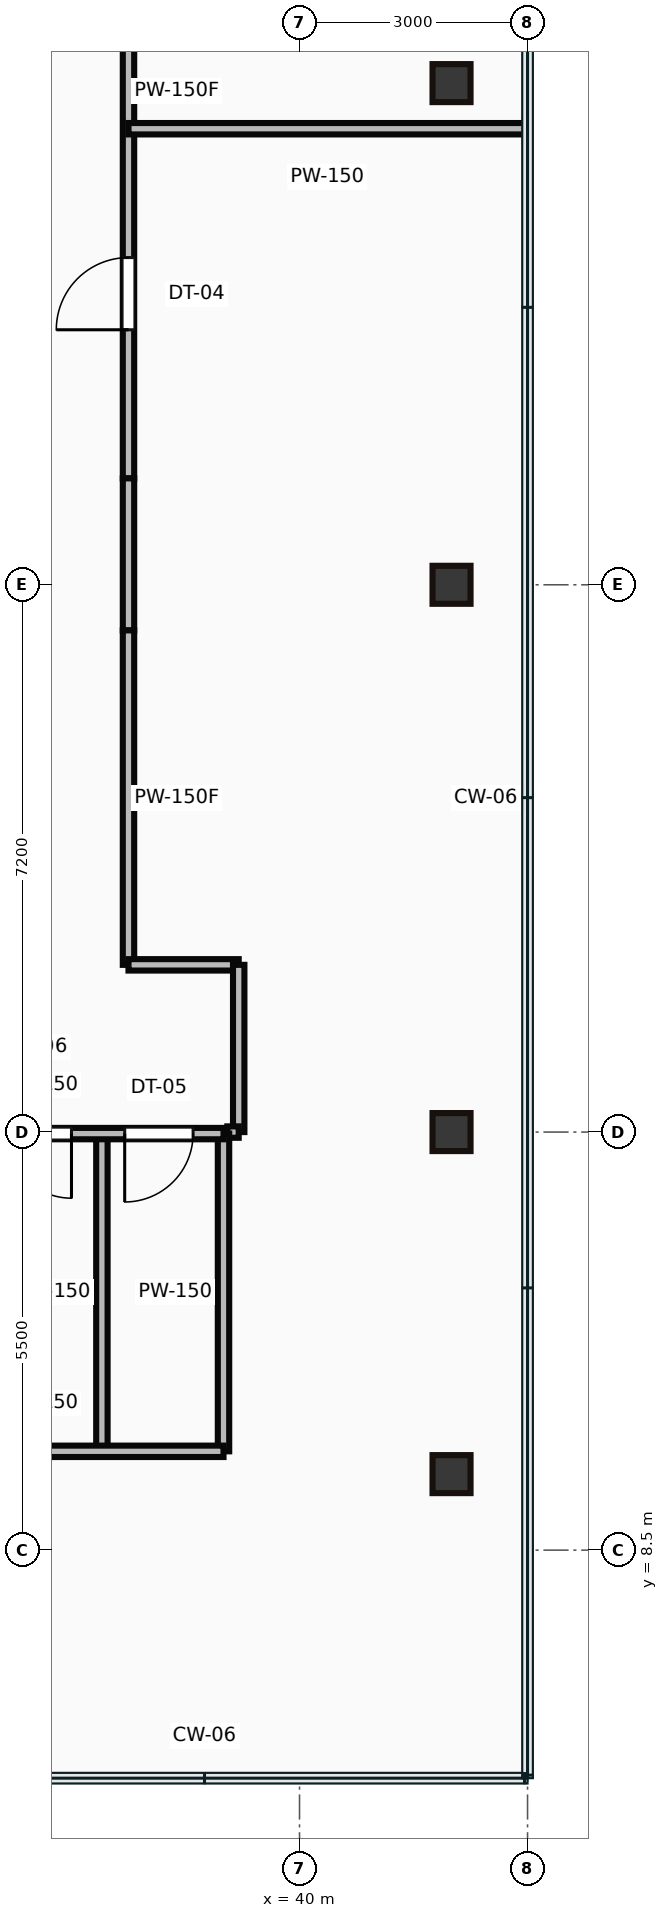
"""IFC4 building model, lengths in metres.
Left out: names, types, materials, properties, quantities, classifications, styles, units other than length and angle.
Written with IfcOpenShell. Run it as: python <this file> out.ifc"""

import sys

from ifc_helpers import new_model, si_unit, direction, frame, frame_2d, origin, origin_2d, place, context, subcontext, project, spatial, rectangle, hollow_rectangle, extrude, source, transform, mapped, element, fill, save


model = new_model("IFC4")
c1 = context("Model", 3, precision=1e-05, world=origin(), true_north=direction((0.0, 1.0)))
c2 = subcontext(c1, "Body", "Model", "MODEL_VIEW")
j1 = project(units=[si_unit("LENGTHUNIT", "METRE"), si_unit("PLANEANGLEUNIT", "RADIAN")], contexts=[c1])
p1 = place(None, origin())
s1 = spatial("IfcSite", under=j1, at=p1, CompositionType="ELEMENT")
p2 = place(p1, origin())
s2 = spatial("IfcBuilding", under=s1, at=p2, CompositionType="ELEMENT")
p3 = place(p2, frame((0.0, 0.0, 288.0)))
s3 = spatial("IfcBuildingStorey", under=s2, at=p3, CompositionType="ELEMENT", Elevation=288.0)
m1 = source(origin(), c2, "Body", "SweptSolid", [
    extrude(hollow_rectangle(XDim=0.5, YDim=0.5, WallThickness=0.022, at=origin_2d()), origin(), (0.0, 0.0, 1.0), 4.25),
])
for number, where, z_axis, x_axis in (
    (1, (42.0, 9.5, 0.0), (0.0, 0.0, 1.0), (1.0, 0.0, 0.0)),
    (2, (42.0, 14.0, 0.0), (0.0, 0.0, 1.0), (1.0, 0.0, 0.0)),
    (3, (42.0, 21.2, 0.0), (0.0, 0.0, 1.0), (1.0, 0.0, 0.0)),
    (4, (42.0, 27.8, 0.0), (0.0, 0.0, 1.0), (1.0, 0.0, 0.0)),
):
    element("IfcColumn", number, at=place(p3, frame(where, z_axis=z_axis, x_axis=x_axis)), inside=s3, PredefinedType="COLUMN", context=c2, shape_type="MappedRepresentation", body=[
        mapped(m1, transform((0.0, 0.0, 0.0))),
    ])
m2 = source(origin(), c2, "Body", "SweptSolid", [
    extrude(rectangle(XDim=4.8, YDim=0.15, at=frame_2d((2.4, 0.0))), origin(), (0.0, 0.0, 1.0), 2.845),
])
p4 = place(p3, frame((34.2, 13.98, 0.0), z_axis=(0.0, 0.0, 1.0), x_axis=(1.0, 0.0, 0.0)))
e5 = element("IfcWall", 5, at=p4, inside=s3, PredefinedType="PARTITIONING", context=c2, shape_type="MappedRepresentation", body=[
    mapped(m2, transform((0.0, 0.0, 0.0))),
])
p5 = place(p4, frame((0.35, 0.0, 0.0)))
e6 = element("IfcOpeningElement", 6, at=p5, cuts=e5, PredefinedType="OPENING", context=c2, shape_type="SweptSolid", body=[
    extrude(rectangle(XDim=0.85, YDim=2.1, at=frame_2d((0.425, 1.05))), frame((0.0, 0.085, 0.0), z_axis=(0.0, -1.0, 0.0), x_axis=(1.0, 0.0, 0.0)), (0.0, 0.0, 1.0), 0.17),
])
p6 = place(p4, frame((1.95, 0.0, 0.0)))
e7 = element("IfcOpeningElement", 7, at=p6, cuts=e5, PredefinedType="OPENING", context=c2, shape_type="SweptSolid", body=[
    extrude(rectangle(XDim=0.85, YDim=2.1, at=frame_2d((0.425, 1.05))), frame((0.0, 0.085, 0.0), z_axis=(0.0, -1.0, 0.0), x_axis=(1.0, 0.0, 0.0)), (0.0, 0.0, 1.0), 0.17),
])
p7 = place(p4, frame((3.5, 0.0, 0.0)))
e8 = element("IfcOpeningElement", 8, at=p7, cuts=e5, PredefinedType="OPENING", context=c2, shape_type="SweptSolid", body=[
    extrude(rectangle(XDim=0.9, YDim=2.1, at=frame_2d((0.45, 1.05))), frame((0.0, 0.085, 0.0), z_axis=(0.0, -1.0, 0.0), x_axis=(1.0, 0.0, 0.0)), (0.0, 0.0, 1.0), 0.17),
])
m3 = source(origin(), c2, "Body", "SweptSolid", [
    extrude(rectangle(XDim=4.8, YDim=0.15, at=frame_2d((2.4, 0.0))), origin(), (0.0, 0.0, 1.0), 3.85),
])
p8 = place(p3, frame((34.2, 9.8, 0.0), z_axis=(0.0, 0.0, 1.0), x_axis=(1.0, 0.0, 0.0)))
e9 = element("IfcWall", 9, at=p8, inside=s3, PredefinedType="PARTITIONING", context=c2, shape_type="MappedRepresentation", body=[
    mapped(m3, transform((0.0, 0.0, 0.0))),
])
m4 = source(origin(), c2, "Body", "SweptSolid", [
    extrude(rectangle(XDim=4.18, YDim=0.15, at=frame_2d((2.09, 0.0))), origin(), (0.0, 0.0, 1.0), 3.85),
])
for number, where, z_axis, x_axis in (
    (10, (39.0, 9.8, 0.0), (0.0, 0.0, 1.0), (0.0, 1.0, 0.0)),
    (11, (37.4, 9.8, 0.0), (0.0, 0.0, 1.0), (0.0, 1.0, 0.0)),
):
    element("IfcWall", number, at=place(p3, frame(where, z_axis=z_axis, x_axis=x_axis)), inside=s3, PredefinedType="PARTITIONING", context=c2, shape_type="MappedRepresentation", body=[
        mapped(m4, transform((0.0, 0.0, 0.0))),
    ])
m5 = source(origin(), c2, "Body", "SweptSolid", [
    extrude(rectangle(XDim=10.2, YDim=0.15, at=frame_2d((5.1, 0.0))), origin(), (0.0, 0.0, 1.0), 3.85),
])
p9 = place(p3, frame((37.75, 32.8, 0.0), z_axis=(0.0, 0.0, 1.0), x_axis=(0.0, -1.0, 0.0)))
e12 = element("IfcWall", 12, at=p9, inside=s3, PredefinedType="PARTITIONING", context=c2, shape_type="MappedRepresentation", body=[
    mapped(m5, transform((0.0, 0.0, 0.0))),
])
p10 = place(p9, frame((7.295, 0.0, 0.0)))
e13 = element("IfcOpeningElement", 13, at=p10, cuts=e12, PredefinedType="OPENING", context=c2, shape_type="SweptSolid", body=[
    extrude(rectangle(XDim=0.95, YDim=2.15, at=frame_2d((0.475, 1.075))), frame((0.0, 0.085, 0.0), z_axis=(0.0, -1.0, 0.0), x_axis=(1.0, 0.0, 0.0)), (0.0, 0.0, 1.0), 0.17),
])
m6 = source(origin(), c2, "Body", "SweptSolid", [
    extrude(rectangle(XDim=2.0, YDim=0.15, at=frame_2d((1.0, 0.0))), origin(), (0.0, 0.0, 1.0), 3.85),
])
p11 = place(p3, frame((37.75, 22.6, 0.0), z_axis=(0.0, 0.0, 1.0), x_axis=(0.0, -1.0, 0.0)))
e14 = element("IfcWall", 14, at=p11, inside=s3, PredefinedType="PARTITIONING", context=c2, shape_type="MappedRepresentation", body=[
    mapped(m6, transform((0.0, 0.0, 0.0))),
])
m7 = source(origin(), c2, "Body", "SweptSolid", [
    extrude(rectangle(XDim=4.4, YDim=0.15, at=frame_2d((2.2, 0.0))), origin(), (0.0, 0.0, 1.0), 3.85),
])
p12 = place(p3, frame((37.75, 20.6, 0.0), z_axis=(0.0, 0.0, 1.0), x_axis=(0.0, -1.0, 0.0)))
e15 = element("IfcWall", 15, at=p12, inside=s3, PredefinedType="PARTITIONING", context=c2, shape_type="MappedRepresentation", body=[
    mapped(m7, transform((0.0, 0.0, 0.0))),
])
m8 = source(origin(), c2, "Body", "SweptSolid", [
    extrude(rectangle(XDim=1.45, YDim=0.15, at=frame_2d((0.725, 0.0))), origin(), (0.0, 0.0, 1.0), 3.85),
])
p13 = place(p3, frame((37.75, 16.2, 0.0), z_axis=(0.0, 0.0, 1.0), x_axis=(1.0, 0.0, 0.0)))
e16 = element("IfcWall", 16, at=p13, inside=s3, PredefinedType="PARTITIONING", context=c2, shape_type="MappedRepresentation", body=[
    mapped(m8, transform((0.0, 0.0, 0.0))),
])
m9 = source(origin(), c2, "Body", "SweptSolid", [
    extrude(rectangle(XDim=2.2, YDim=0.15, at=frame_2d((1.1, 0.0))), origin(), (0.0, 0.0, 1.0), 3.85),
])
p14 = place(p3, frame((39.2, 16.2, 0.0), z_axis=(0.0, 0.0, 1.0), x_axis=(0.0, -1.0, 0.0)))
e17 = element("IfcWall", 17, at=p14, inside=s3, PredefinedType="PARTITIONING", context=c2, shape_type="MappedRepresentation", body=[
    mapped(m9, transform((0.0, 0.0, 0.0))),
])
m10 = source(origin(), c2, "Body", "SweptSolid", [
    extrude(rectangle(XDim=0.15, YDim=0.15, at=frame_2d((0.075, 0.0))), origin(), (0.0, 0.0, 1.0), 3.85),
])
p15 = place(p3, frame((39.2, 14.0, 0.0), z_axis=(0.0, 0.0, 1.0), x_axis=(-1.0, 0.0, 0.0)))
e18 = element("IfcWall", 18, at=p15, inside=s3, PredefinedType="PARTITIONING", context=c2, shape_type="MappedRepresentation", body=[
    mapped(m10, transform((0.0, 0.0, 0.0))),
])
m11 = source(origin(), c2, "Body", "SweptSolid", [
    extrude(rectangle(XDim=5.23, YDim=0.15, at=frame_2d((2.615, 0.0))), origin(), (0.0, 0.0, 1.0), 3.85),
])
p16 = place(p3, frame((42.98, 27.2, 0.0), z_axis=(0.0, 0.0, 1.0), x_axis=(-1.0, 0.0, 0.0)))
e19 = element("IfcWall", 19, at=p16, inside=s3, PredefinedType="PARTITIONING", context=c2, shape_type="MappedRepresentation", body=[
    mapped(m11, transform((0.0, 0.0, 0.0))),
])
m12 = source(origin(), c2, "Body", "SweptSolid", [
    extrude(rectangle(XDim=0.85, YDim=2.1, at=frame_2d((0.425, 1.05))), frame((0.0, 0.025, 0.0), z_axis=(0.0, -1.0, 0.0), x_axis=(1.0, 0.0, 0.0)), (0.0, 0.0, 1.0), 0.05),
])
p17 = place(p6, frame((0.85, 0.0, 0.0), z_axis=(0.0, 0.0, 1.0), x_axis=(-1.0, 0.0, 0.0)))
e20 = element("IfcDoor", 20, at=p17, inside=s3, OperationType="SINGLE_SWING_RIGHT", PredefinedType="DOOR", context=c2, shape_type="MappedRepresentation", body=[
    mapped(m12, transform((0.0, 0.0, 0.0))),
])
fill(e7, e20)
m13 = source(origin(), c2, "Body", "SweptSolid", [
    extrude(rectangle(XDim=0.9, YDim=2.1, at=frame_2d((0.45, 1.05))), frame((0.0, 0.025, 0.0), z_axis=(0.0, -1.0, 0.0), x_axis=(1.0, 0.0, 0.0)), (0.0, 0.0, 1.0), 0.05),
])
p18 = place(p7, frame((0.9, 0.0, 0.0), z_axis=(0.0, 0.0, 1.0), x_axis=(-1.0, 0.0, 0.0)))
e21 = element("IfcDoor", 21, at=p18, inside=s3, OperationType="SINGLE_SWING_LEFT", PredefinedType="DOOR", context=c2, shape_type="MappedRepresentation", body=[
    mapped(m13, transform((0.0, 0.0, 0.0))),
])
fill(e8, e21)
m14 = source(origin(), c2, "Body", "SweptSolid", [
    extrude(rectangle(XDim=0.95, YDim=2.15, at=frame_2d((0.475, 1.075))), frame((0.0, 0.025, 0.0), z_axis=(0.0, -1.0, 0.0), x_axis=(1.0, 0.0, 0.0)), (0.0, 0.0, 1.0), 0.05),
])
p19 = place(p10, origin())
e22 = element("IfcDoor", 22, at=p19, inside=s3, OperationType="SINGLE_SWING_RIGHT", PredefinedType="DOOR", context=c2, shape_type="MappedRepresentation", body=[
    mapped(m14, transform((0.0, 0.0, 0.0))),
])
fill(e13, e22)
save(model, sys.argv[1])
